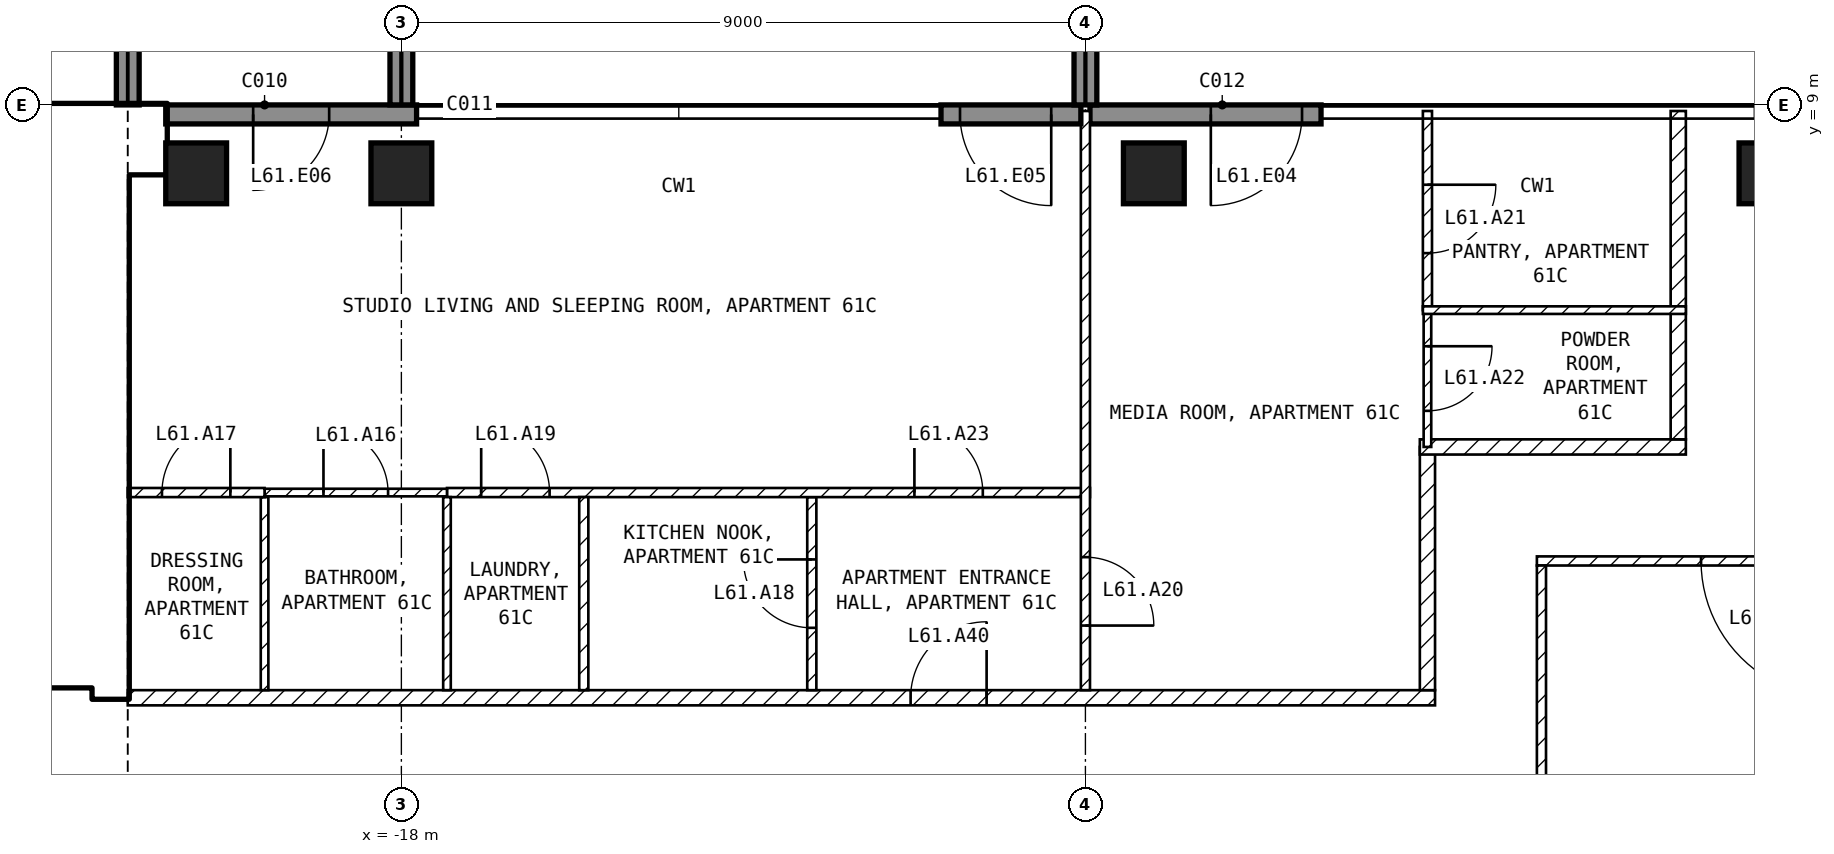
"""IFC4 building model, lengths in metres.
Left out: names, types, materials, properties, quantities, classifications, styles, units other than length and angle.
Written with IfcOpenShell. Run it as: python <this file> out.ifc"""

import sys

from ifc_helpers import new_model, si_unit, direction, frame, frame_2d, origin, origin_2d, place, context, subcontext, project, spatial, rectangle, extrude, element, fill, save


model = new_model("IFC4")
c1 = context("Model", 3, precision=1e-05, world=origin(), true_north=direction((0.0, 1.0)))
c2 = subcontext(c1, "Body", "Model", "MODEL_VIEW")
j1 = project(units=[si_unit("LENGTHUNIT", "METRE"), si_unit("PLANEANGLEUNIT", "RADIAN")], contexts=[c1])
p1 = place(None, origin())
s1 = spatial("IfcSite", under=j1, at=p1, CompositionType="ELEMENT")
p2 = place(p1, origin())
s2 = spatial("IfcBuilding", under=s1, at=p2, CompositionType="ELEMENT")
p3 = place(p2, frame((0.0, 0.0, 243.0)))
s3 = spatial("IfcBuildingStorey", under=s2, at=p3, CompositionType="ELEMENT", Elevation=243.0)
for number, where, z_axis, x_axis in (
    (1, (-20.7, 8.1, -0.25), (0.0, 0.0, 1.0), (1.0, 0.0, 0.0)),
    (2, (-18.0, 8.1, -0.25), (0.0, 0.0, 1.0), (1.0, 0.0, 0.0)),
    (3, (-8.1, 8.1, -0.25), (0.0, 0.0, 1.0), (1.0, 0.0, 0.0)),
    (4, (0.0, 8.1, -0.25), (0.0, 0.0, 1.0), (1.0, 0.0, 0.0)),
):
    element("IfcColumn", number, at=place(p3, frame(where, z_axis=z_axis, x_axis=x_axis)), inside=s3, PredefinedType="COLUMN", context=c2, shape_type="SweptSolid", body=[
        extrude(rectangle(XDim=0.8, YDim=0.8, at=origin_2d()), origin(), (0.0, 0.0, 1.0), 3.5),
    ])
p4 = place(p3, frame((-5.9, 8.875, 0.0), z_axis=(0.0, 0.0, 1.0), x_axis=(-1.0, 0.0, 0.0)))
e5 = element("IfcWall", 5, at=p4, inside=s3, PredefinedType="SOLIDWALL", context=c2, shape_type="SweptSolid", body=[
    extrude(rectangle(XDim=3.04, YDim=0.25, at=frame_2d((1.52, 0.0))), origin(), (0.0, 0.0, 1.0), 3.25),
])
p5 = place(p4, frame((0.25, 0.0, 0.0)))
e6 = element("IfcOpeningElement", 6, at=p5, cuts=e5, PredefinedType="OPENING", context=c2, shape_type="SweptSolid", body=[
    extrude(rectangle(XDim=1.2, YDim=2.4, at=frame_2d((0.6, 1.2))), frame((0.0, 0.135, 0.0), z_axis=(0.0, -1.0, 0.0), x_axis=(1.0, 0.0, 0.0)), (0.0, 0.0, 1.0), 0.27),
])
p6 = place(p3, frame((-9.06, 8.875, 0.0), z_axis=(0.0, 0.0, 1.0), x_axis=(-1.0, 0.0, 0.0)))
e7 = element("IfcWall", 7, at=p6, inside=s3, PredefinedType="SOLIDWALL", context=c2, shape_type="SweptSolid", body=[
    extrude(rectangle(XDim=1.84, YDim=0.25, at=frame_2d((0.92, 0.0))), origin(), (0.0, 0.0, 1.0), 3.25),
])
p7 = place(p6, frame((0.39, 0.0, 0.0)))
e8 = element("IfcOpeningElement", 8, at=p7, cuts=e7, PredefinedType="OPENING", context=c2, shape_type="SweptSolid", body=[
    extrude(rectangle(XDim=1.2, YDim=2.4, at=frame_2d((0.6, 1.2))), frame((0.0, 0.135, 0.0), z_axis=(0.0, -1.0, 0.0), x_axis=(1.0, 0.0, 0.0)), (0.0, 0.0, 1.0), 0.27),
])
p8 = place(p3, frame((-17.8, 8.875, 0.0), z_axis=(0.0, 0.0, 1.0), x_axis=(-1.0, 0.0, 0.0)))
e9 = element("IfcWall", 9, at=p8, inside=s3, PredefinedType="SOLIDWALL", context=c2, shape_type="SweptSolid", body=[
    extrude(rectangle(XDim=3.3, YDim=0.25, at=frame_2d((1.65, 0.0))), origin(), (0.0, 0.0, 1.0), 3.25),
])
p9 = place(p8, frame((1.15, 0.0, 0.0)))
e10 = element("IfcOpeningElement", 10, at=p9, cuts=e9, PredefinedType="OPENING", context=c2, shape_type="SweptSolid", body=[
    extrude(rectangle(XDim=1.0, YDim=2.4, at=frame_2d((0.5, 1.2))), frame((0.0, 0.135, 0.0), z_axis=(0.0, -1.0, 0.0), x_axis=(1.0, 0.0, 0.0)), (0.0, 0.0, 1.0), 0.27),
])
for number, where, z_axis, x_axis in (
    (11, (-21.6, 9.0, 0.0), (0.0, 0.0, 1.0), (0.0, 1.0, 0.0)),
    (12, (-18.0, 9.0, 0.0), (0.0, 0.0, 1.0), (0.0, 1.0, 0.0)),
    (13, (-9.0, 9.0, 0.0), (0.0, 0.0, 1.0), (0.0, 1.0, 0.0)),
):
    element("IfcWall", number, at=place(p3, frame(where, z_axis=z_axis, x_axis=x_axis)), inside=s3, PredefinedType="SOLIDWALL", context=c2, shape_type="SweptSolid", body=[
        extrude(rectangle(XDim=2.7, YDim=0.3, at=frame_2d((1.35, 0.0))), origin(), (0.0, 0.0, 1.0), 3.25),
    ])
p10 = place(p3, frame((-29.75, 8.55, 0.0), z_axis=(0.0, 0.0, 1.0), x_axis=(1.0, 0.0, 0.0)))
e14 = element("IfcWall", 14, at=p10, inside=s3, PredefinedType="SHEAR", context=c2, shape_type="SweptSolid", body=[
    extrude(rectangle(XDim=8.65, YDim=0.9, at=frame_2d((4.325, 0.0))), origin(), (0.0, 0.0, 1.0), 3.25),
])
p11 = place(p3, frame((-21.825, 1.2, 0.0), z_axis=(0.0, 0.0, 1.0), x_axis=(0.0, 1.0, 0.0)))
e15 = element("IfcWall", 15, at=p11, inside=s3, PredefinedType="SHEAR", context=c2, shape_type="SweptSolid", body=[
    extrude(rectangle(XDim=6.9, YDim=0.45, at=frame_2d((3.45, 0.0))), origin(), (0.0, 0.0, 1.0), 3.25),
])
p12 = place(p3, frame((-33.35, 1.45, 0.0), z_axis=(0.0, 0.0, 1.0), x_axis=(1.0, 0.0, 0.0)))
e16 = element("IfcWall", 16, at=p12, inside=s3, PredefinedType="SOLIDWALL", context=c2, shape_type="SweptSolid", body=[
    extrude(rectangle(XDim=11.3, YDim=0.2, at=frame_2d((5.65, 0.0))), origin(), (0.0, 0.0, 1.0), 3.25),
])
p13 = place(p12, frame((9.55, 0.0, 0.0)))
e17 = element("IfcOpeningElement", 17, at=p13, cuts=e16, PredefinedType="OPENING", context=c2, shape_type="SweptSolid", body=[
    extrude(rectangle(XDim=1.0, YDim=2.1, at=frame_2d((0.5, 1.05))), frame((0.0, 0.11, 0.0), z_axis=(0.0, -1.0, 0.0), x_axis=(1.0, 0.0, 0.0)), (0.0, 0.0, 1.0), 0.22),
])
p14 = place(p12, frame((7.05, 0.0, 0.0)))
e18 = element("IfcOpeningElement", 18, at=p14, cuts=e16, PredefinedType="OPENING", context=c2, shape_type="SweptSolid", body=[
    extrude(rectangle(XDim=1.0, YDim=2.1, at=frame_2d((0.5, 1.05))), frame((0.0, 0.11, 0.0), z_axis=(0.0, -1.0, 0.0), x_axis=(1.0, 0.0, 0.0)), (0.0, 0.0, 1.0), 0.22),
])
p15 = place(p12, frame((1.175, 0.0, 0.0)))
e19 = element("IfcOpeningElement", 19, at=p15, cuts=e16, PredefinedType="OPENING", context=c2, shape_type="SweptSolid", body=[
    extrude(rectangle(XDim=0.9, YDim=2.1, at=frame_2d((0.45, 1.05))), frame((0.0, 0.11, 0.0), z_axis=(0.0, -1.0, 0.0), x_axis=(1.0, 0.0, 0.0)), (0.0, 0.0, 1.0), 0.22),
])
p16 = place(p3, frame((-28.35, 5.15, 0.0), z_axis=(0.0, 0.0, 1.0), x_axis=(1.0, 0.0, 0.0)))
e20 = element("IfcWall", 20, at=p16, inside=s3, PredefinedType="SOLIDWALL", context=c2, shape_type="SweptSolid", body=[
    extrude(rectangle(XDim=6.3, YDim=0.2, at=frame_2d((3.15, 0.0))), origin(), (0.0, 0.0, 1.0), 3.25),
])
p17 = place(p16, frame((5.1, 0.0, 0.0)))
e21 = element("IfcOpeningElement", 21, at=p17, cuts=e20, PredefinedType="OPENING", context=c2, shape_type="SweptSolid", body=[
    extrude(rectangle(XDim=1.0, YDim=2.1, at=frame_2d((0.5, 1.05))), frame((0.0, 0.11, 0.0), z_axis=(0.0, -1.0, 0.0), x_axis=(1.0, 0.0, 0.0)), (0.0, 0.0, 1.0), 0.22),
])
p18 = place(p3, frame((3.06, 3.0, 0.0), z_axis=(0.0, 0.0, 1.0), x_axis=(-1.0, 0.0, 0.0)))
e22 = element("IfcWall", 22, at=p18, inside=s3, PredefinedType="PARTITIONING", context=c2, shape_type="SweptSolid", body=[
    extrude(rectangle(XDim=6.12, YDim=0.12, at=frame_2d((3.06, 0.0))), origin(), (0.0, 0.0, 1.0), 3.25),
])
p19 = place(p18, frame((2.16, 0.0, 0.0)))
e23 = element("IfcOpeningElement", 23, at=p19, cuts=e22, PredefinedType="OPENING", context=c2, shape_type="SweptSolid", body=[
    extrude(rectangle(XDim=1.8, YDim=2.1, at=frame_2d((0.9, 1.05))), frame((0.0, 0.07, 0.0), z_axis=(0.0, -1.0, 0.0), x_axis=(1.0, 0.0, 0.0)), (0.0, 0.0, 1.0), 0.14),
])
p20 = place(p3, frame((-3.0, 2.94, 0.0), z_axis=(0.0, 0.0, 1.0), x_axis=(0.0, -1.0, 0.0)))
e24 = element("IfcWall", 24, at=p20, inside=s3, PredefinedType="PARTITIONING", context=c2, shape_type="SweptSolid", body=[
    extrude(rectangle(XDim=5.88, YDim=0.12, at=frame_2d((2.94, 0.0))), origin(), (0.0, 0.0, 1.0), 3.25),
])
p21 = place(p3, frame((-21.6, 1.2, 0.0), z_axis=(0.0, 0.0, 1.0), x_axis=(1.0, 0.0, 0.0)))
e25 = element("IfcWall", 25, at=p21, inside=s3, PredefinedType="PARTITIONING", context=c2, shape_type="SweptSolid", body=[
    extrude(rectangle(XDim=17.2, YDim=0.2, at=frame_2d((8.6, 0.0))), origin(), (0.0, 0.0, 1.0), 3.25),
])
p22 = place(p21, frame((10.3, 0.0, 0.0)))
e26 = element("IfcOpeningElement", 26, at=p22, cuts=e25, PredefinedType="OPENING", context=c2, shape_type="SweptSolid", body=[
    extrude(rectangle(XDim=1.0, YDim=2.1, at=frame_2d((0.5, 1.05))), frame((0.0, 0.11, 0.0), z_axis=(0.0, -1.0, 0.0), x_axis=(1.0, 0.0, 0.0)), (0.0, 0.0, 1.0), 0.22),
])
p23 = place(p3, frame((-4.5, 1.3, 0.0), z_axis=(0.0, 0.0, 1.0), x_axis=(0.0, 1.0, 0.0)))
e27 = element("IfcWall", 27, at=p23, inside=s3, PredefinedType="PARTITIONING", context=c2, shape_type="SweptSolid", body=[
    extrude(rectangle(XDim=3.2, YDim=0.2, at=frame_2d((1.6, 0.0))), origin(), (0.0, 0.0, 1.0), 3.25),
])
p24 = place(p3, frame((-4.6, 4.5, 0.0), z_axis=(0.0, 0.0, 1.0), x_axis=(1.0, 0.0, 0.0)))
e28 = element("IfcWall", 28, at=p24, inside=s3, PredefinedType="PARTITIONING", context=c2, shape_type="SweptSolid", body=[
    extrude(rectangle(XDim=3.5, YDim=0.2, at=frame_2d((1.75, 0.0))), origin(), (0.0, 0.0, 1.0), 3.25),
])
p25 = place(p3, frame((-1.2, 4.6, 0.0), z_axis=(0.0, 0.0, 1.0), x_axis=(0.0, 1.0, 0.0)))
e29 = element("IfcWall", 29, at=p25, inside=s3, PredefinedType="PARTITIONING", context=c2, shape_type="SweptSolid", body=[
    extrude(rectangle(XDim=4.32, YDim=0.2, at=frame_2d((2.16, 0.0))), origin(), (0.0, 0.0, 1.0), 3.25),
])
p26 = place(p3, frame((-12.6, 1.3, 0.0), z_axis=(0.0, 0.0, 1.0), x_axis=(0.0, 1.0, 0.0)))
e30 = element("IfcWall", 30, at=p26, inside=s3, PredefinedType="PARTITIONING", context=c2, shape_type="SweptSolid", body=[
    extrude(rectangle(XDim=2.54, YDim=0.12, at=frame_2d((1.27, 0.0))), origin(), (0.0, 0.0, 1.0), 3.25),
])
p27 = place(p26, frame((0.82, 0.0, 0.0)))
e31 = element("IfcOpeningElement", 31, at=p27, cuts=e30, PredefinedType="OPENING", context=c2, shape_type="SweptSolid", body=[
    extrude(rectangle(XDim=0.9, YDim=2.1, at=frame_2d((0.45, 1.05))), frame((0.0, 0.07, 0.0), z_axis=(0.0, -1.0, 0.0), x_axis=(1.0, 0.0, 0.0)), (0.0, 0.0, 1.0), 0.14),
])
p28 = place(p3, frame((-17.4, 3.9, 0.0), z_axis=(0.0, 0.0, 1.0), x_axis=(1.0, 0.0, 0.0)))
e32 = element("IfcWall", 32, at=p28, inside=s3, PredefinedType="PARTITIONING", context=c2, shape_type="SweptSolid", body=[
    extrude(rectangle(XDim=8.46, YDim=0.12, at=frame_2d((4.23, 0.0))), origin(), (0.0, 0.0, 1.0), 3.25),
])
p29 = place(p28, frame((0.45, 0.0, 0.0)))
e33 = element("IfcOpeningElement", 33, at=p29, cuts=e32, PredefinedType="OPENING", context=c2, shape_type="SweptSolid", body=[
    extrude(rectangle(XDim=0.9, YDim=2.1, at=frame_2d((0.45, 1.05))), frame((0.0, 0.07, 0.0), z_axis=(0.0, -1.0, 0.0), x_axis=(1.0, 0.0, 0.0)), (0.0, 0.0, 1.0), 0.14),
])
p30 = place(p28, frame((6.15, 0.0, 0.0)))
e34 = element("IfcOpeningElement", 34, at=p30, cuts=e32, PredefinedType="OPENING", context=c2, shape_type="SweptSolid", body=[
    extrude(rectangle(XDim=0.9, YDim=2.1, at=frame_2d((0.45, 1.05))), frame((0.0, 0.07, 0.0), z_axis=(0.0, -1.0, 0.0), x_axis=(1.0, 0.0, 0.0)), (0.0, 0.0, 1.0), 0.14),
])
p31 = place(p3, frame((-9.0, 8.92, 0.0), z_axis=(0.0, 0.0, 1.0), x_axis=(0.0, -1.0, 0.0)))
e35 = element("IfcWall", 35, at=p31, inside=s3, PredefinedType="PARTITIONING", context=c2, shape_type="SweptSolid", body=[
    extrude(rectangle(XDim=7.62, YDim=0.12, at=frame_2d((3.81, 0.0))), origin(), (0.0, 0.0, 1.0), 3.25),
])
p32 = place(p31, frame((5.87, 0.0, 0.0)))
e36 = element("IfcOpeningElement", 36, at=p32, cuts=e35, PredefinedType="OPENING", context=c2, shape_type="SweptSolid", body=[
    extrude(rectangle(XDim=0.9, YDim=2.1, at=frame_2d((0.45, 1.05))), frame((0.0, 0.07, 0.0), z_axis=(0.0, -1.0, 0.0), x_axis=(1.0, 0.0, 0.0)), (0.0, 0.0, 1.0), 0.14),
])
p33 = place(p3, frame((-15.6, 1.3, 0.0), z_axis=(0.0, 0.0, 1.0), x_axis=(0.0, 1.0, 0.0)))
e37 = element("IfcWall", 37, at=p33, inside=s3, PredefinedType="PARTITIONING", context=c2, shape_type="SweptSolid", body=[
    extrude(rectangle(XDim=2.54, YDim=0.12, at=frame_2d((1.27, 0.0))), origin(), (0.0, 0.0, 1.0), 3.25),
])
for number, where, z_axis, x_axis in (
    (38, (-17.4, 1.3, 0.0), (0.0, 0.0, 1.0), (0.0, 1.0, 0.0)),
    (39, (-19.8, 1.3, 0.0), (0.0, 0.0, 1.0), (0.0, 1.0, 0.0)),
):
    element("IfcWall", number, at=place(p3, frame(where, z_axis=z_axis, x_axis=x_axis)), inside=s3, PredefinedType="PARTITIONING", context=c2, shape_type="SweptSolid", body=[
        extrude(rectangle(XDim=2.54, YDim=0.1, at=frame_2d((1.27, 0.0))), origin(), (0.0, 0.0, 1.0), 3.25),
    ])
p34 = place(p3, frame((-19.8, 3.9, 0.0), z_axis=(0.0, 0.0, 1.0), x_axis=(1.0, 0.0, 0.0)))
e40 = element("IfcWall", 40, at=p34, inside=s3, PredefinedType="PARTITIONING", context=c2, shape_type="SweptSolid", body=[
    extrude(rectangle(XDim=2.4, YDim=0.1, at=frame_2d((1.2, 0.0))), origin(), (0.0, 0.0, 1.0), 3.25),
])
p35 = place(p34, frame((0.775, 0.0, 0.0)))
e41 = element("IfcOpeningElement", 41, at=p35, cuts=e40, PredefinedType="OPENING", context=c2, shape_type="SweptSolid", body=[
    extrude(rectangle(XDim=0.85, YDim=2.1, at=frame_2d((0.425, 1.05))), frame((0.0, 0.06, 0.0), z_axis=(0.0, -1.0, 0.0), x_axis=(1.0, 0.0, 0.0)), (0.0, 0.0, 1.0), 0.12),
])
p36 = place(p3, frame((-21.6, 3.9, 0.0), z_axis=(0.0, 0.0, 1.0), x_axis=(1.0, 0.0, 0.0)))
e42 = element("IfcWall", 42, at=p36, inside=s3, PredefinedType="PARTITIONING", context=c2, shape_type="SweptSolid", body=[
    extrude(rectangle(XDim=1.8, YDim=0.12, at=frame_2d((0.9, 0.0))), origin(), (0.0, 0.0, 1.0), 3.25),
])
p37 = place(p36, frame((0.45, 0.0, 0.0)))
e43 = element("IfcOpeningElement", 43, at=p37, cuts=e42, PredefinedType="OPENING", context=c2, shape_type="SweptSolid", body=[
    extrude(rectangle(XDim=0.9, YDim=2.1, at=frame_2d((0.45, 1.05))), frame((0.0, 0.07, 0.0), z_axis=(0.0, -1.0, 0.0), x_axis=(1.0, 0.0, 0.0)), (0.0, 0.0, 1.0), 0.14),
])
p38 = place(p3, frame((-4.5, 6.3, 0.0), z_axis=(0.0, 0.0, 1.0), x_axis=(0.0, -1.0, 0.0)))
e44 = element("IfcWall", 44, at=p38, inside=s3, PredefinedType="PARTITIONING", context=c2, shape_type="SweptSolid", body=[
    extrude(rectangle(XDim=1.8, YDim=0.1, at=frame_2d((0.9, 0.0))), origin(), (0.0, 0.0, 1.0), 3.25),
])
p39 = place(p38, frame((0.475, 0.0, 0.0)))
e45 = element("IfcOpeningElement", 45, at=p39, cuts=e44, PredefinedType="OPENING", context=c2, shape_type="SweptSolid", body=[
    extrude(rectangle(XDim=0.85, YDim=2.1, at=frame_2d((0.425, 1.05))), frame((0.0, 0.06, 0.0), z_axis=(0.0, -1.0, 0.0), x_axis=(1.0, 0.0, 0.0)), (0.0, 0.0, 1.0), 0.12),
])
p40 = place(p3, frame((-4.5, 8.92, 0.0), z_axis=(0.0, 0.0, 1.0), x_axis=(0.0, -1.0, 0.0)))
e46 = element("IfcWall", 46, at=p40, inside=s3, PredefinedType="PARTITIONING", context=c2, shape_type="SweptSolid", body=[
    extrude(rectangle(XDim=2.62, YDim=0.12, at=frame_2d((1.31, 0.0))), origin(), (0.0, 0.0, 1.0), 3.25),
])
p41 = place(p40, frame((0.97, 0.0, 0.0)))
e47 = element("IfcOpeningElement", 47, at=p41, cuts=e46, PredefinedType="OPENING", context=c2, shape_type="SweptSolid", body=[
    extrude(rectangle(XDim=0.9, YDim=2.1, at=frame_2d((0.45, 1.05))), frame((0.0, 0.07, 0.0), z_axis=(0.0, -1.0, 0.0), x_axis=(1.0, 0.0, 0.0)), (0.0, 0.0, 1.0), 0.14),
])
p42 = place(p3, frame((-4.56, 6.3, 0.0), z_axis=(0.0, 0.0, 1.0), x_axis=(1.0, 0.0, 0.0)))
e48 = element("IfcWall", 48, at=p42, inside=s3, PredefinedType="PARTITIONING", context=c2, shape_type="SweptSolid", body=[
    extrude(rectangle(XDim=3.46, YDim=0.1, at=frame_2d((1.73, 0.0))), origin(), (0.0, 0.0, 1.0), 3.25),
])
p43 = place(p5, origin())
e49 = element("IfcDoor", 49, at=p43, inside=s3, OperationType="SINGLE_SWING_RIGHT", PredefinedType="DOOR", context=c2, shape_type="SweptSolid", body=[
    extrude(rectangle(XDim=1.2, YDim=2.4, at=frame_2d((0.6, 1.2))), frame((0.0, 0.025, 0.0), z_axis=(0.0, -1.0, 0.0), x_axis=(1.0, 0.0, 0.0)), (0.0, 0.0, 1.0), 0.05),
])
fill(e6, e49)
p44 = place(p7, origin())
e50 = element("IfcDoor", 50, at=p44, inside=s3, OperationType="SINGLE_SWING_LEFT", PredefinedType="DOOR", context=c2, shape_type="SweptSolid", body=[
    extrude(rectangle(XDim=1.2, YDim=2.4, at=frame_2d((0.6, 1.2))), frame((0.0, 0.025, 0.0), z_axis=(0.0, -1.0, 0.0), x_axis=(1.0, 0.0, 0.0)), (0.0, 0.0, 1.0), 0.05),
])
fill(e8, e50)
p45 = place(p9, origin())
e51 = element("IfcDoor", 51, at=p45, inside=s3, OperationType="SINGLE_SWING_RIGHT", PredefinedType="DOOR", context=c2, shape_type="SweptSolid", body=[
    extrude(rectangle(XDim=1.0, YDim=2.4, at=frame_2d((0.5, 1.2))), frame((0.0, 0.025, 0.0), z_axis=(0.0, -1.0, 0.0), x_axis=(1.0, 0.0, 0.0)), (0.0, 0.0, 1.0), 0.05),
])
fill(e10, e51)
p46 = place(p17, origin())
e52 = element("IfcDoor", 52, at=p46, inside=s3, OperationType="SINGLE_SWING_LEFT", PredefinedType="DOOR", context=c2, shape_type="SweptSolid", body=[
    extrude(rectangle(XDim=1.0, YDim=2.1, at=frame_2d((0.5, 1.05))), frame((0.0, 0.025, 0.0), z_axis=(0.0, -1.0, 0.0), x_axis=(1.0, 0.0, 0.0)), (0.0, 0.0, 1.0), 0.05),
])
fill(e21, e52)
p47 = place(p19, origin())
e53 = element("IfcDoor", 53, at=p47, inside=s3, OperationType="SINGLE_SWING_LEFT", PredefinedType="DOOR", context=c2, shape_type="SweptSolid", body=[
    extrude(rectangle(XDim=1.8, YDim=2.1, at=frame_2d((0.9, 1.05))), frame((0.0, 0.025, 0.0), z_axis=(0.0, -1.0, 0.0), x_axis=(1.0, 0.0, 0.0)), (0.0, 0.0, 1.0), 0.05),
])
fill(e23, e53)
p48 = place(p35, origin())
e54 = element("IfcDoor", 54, at=p48, inside=s3, OperationType="SINGLE_SWING_LEFT", PredefinedType="DOOR", context=c2, shape_type="SweptSolid", body=[
    extrude(rectangle(XDim=0.85, YDim=2.1, at=frame_2d((0.425, 1.05))), frame((0.0, 0.025, 0.0), z_axis=(0.0, -1.0, 0.0), x_axis=(1.0, 0.0, 0.0)), (0.0, 0.0, 1.0), 0.05),
])
fill(e41, e54)
p49 = place(p37, origin())
e55 = element("IfcDoor", 55, at=p49, inside=s3, OperationType="SINGLE_SWING_RIGHT", PredefinedType="DOOR", context=c2, shape_type="SweptSolid", body=[
    extrude(rectangle(XDim=0.9, YDim=2.1, at=frame_2d((0.45, 1.05))), frame((0.0, 0.025, 0.0), z_axis=(0.0, -1.0, 0.0), x_axis=(1.0, 0.0, 0.0)), (0.0, 0.0, 1.0), 0.05),
])
fill(e43, e55)
p50 = place(p27, origin())
e56 = element("IfcDoor", 56, at=p50, inside=s3, OperationType="SINGLE_SWING_RIGHT", PredefinedType="DOOR", context=c2, shape_type="SweptSolid", body=[
    extrude(rectangle(XDim=0.9, YDim=2.1, at=frame_2d((0.45, 1.05))), frame((0.0, 0.025, 0.0), z_axis=(0.0, -1.0, 0.0), x_axis=(1.0, 0.0, 0.0)), (0.0, 0.0, 1.0), 0.05),
])
fill(e31, e56)
p51 = place(p29, origin())
e57 = element("IfcDoor", 57, at=p51, inside=s3, OperationType="SINGLE_SWING_LEFT", PredefinedType="DOOR", context=c2, shape_type="SweptSolid", body=[
    extrude(rectangle(XDim=0.9, YDim=2.1, at=frame_2d((0.45, 1.05))), frame((0.0, 0.025, 0.0), z_axis=(0.0, -1.0, 0.0), x_axis=(1.0, 0.0, 0.0)), (0.0, 0.0, 1.0), 0.05),
])
fill(e33, e57)
p52 = place(p32, origin())
e58 = element("IfcDoor", 58, at=p52, inside=s3, OperationType="SINGLE_SWING_RIGHT", PredefinedType="DOOR", context=c2, shape_type="SweptSolid", body=[
    extrude(rectangle(XDim=0.9, YDim=2.1, at=frame_2d((0.45, 1.05))), frame((0.0, 0.025, 0.0), z_axis=(0.0, -1.0, 0.0), x_axis=(1.0, 0.0, 0.0)), (0.0, 0.0, 1.0), 0.05),
])
fill(e36, e58)
p53 = place(p41, origin())
e59 = element("IfcDoor", 59, at=p53, inside=s3, OperationType="SINGLE_SWING_LEFT", PredefinedType="DOOR", context=c2, shape_type="SweptSolid", body=[
    extrude(rectangle(XDim=0.9, YDim=2.1, at=frame_2d((0.45, 1.05))), frame((0.0, 0.025, 0.0), z_axis=(0.0, -1.0, 0.0), x_axis=(1.0, 0.0, 0.0)), (0.0, 0.0, 1.0), 0.05),
])
fill(e47, e59)
p54 = place(p39, origin())
e60 = element("IfcDoor", 60, at=p54, inside=s3, OperationType="SINGLE_SWING_LEFT", PredefinedType="DOOR", context=c2, shape_type="SweptSolid", body=[
    extrude(rectangle(XDim=0.85, YDim=2.1, at=frame_2d((0.425, 1.05))), frame((0.0, 0.025, 0.0), z_axis=(0.0, -1.0, 0.0), x_axis=(1.0, 0.0, 0.0)), (0.0, 0.0, 1.0), 0.05),
])
fill(e45, e60)
p55 = place(p30, origin())
e61 = element("IfcDoor", 61, at=p55, inside=s3, OperationType="SINGLE_SWING_LEFT", PredefinedType="DOOR", context=c2, shape_type="SweptSolid", body=[
    extrude(rectangle(XDim=0.9, YDim=2.1, at=frame_2d((0.45, 1.05))), frame((0.0, 0.025, 0.0), z_axis=(0.0, -1.0, 0.0), x_axis=(1.0, 0.0, 0.0)), (0.0, 0.0, 1.0), 0.05),
])
fill(e34, e61)
p56 = place(p22, origin())
e62 = element("IfcDoor", 62, at=p56, inside=s3, OperationType="SINGLE_SWING_RIGHT", PredefinedType="DOOR", context=c2, shape_type="SweptSolid", body=[
    extrude(rectangle(XDim=1.0, YDim=2.1, at=frame_2d((0.5, 1.05))), frame((0.0, 0.025, 0.0), z_axis=(0.0, -1.0, 0.0), x_axis=(1.0, 0.0, 0.0)), (0.0, 0.0, 1.0), 0.05),
])
fill(e26, e62)
save(model, sys.argv[1])
